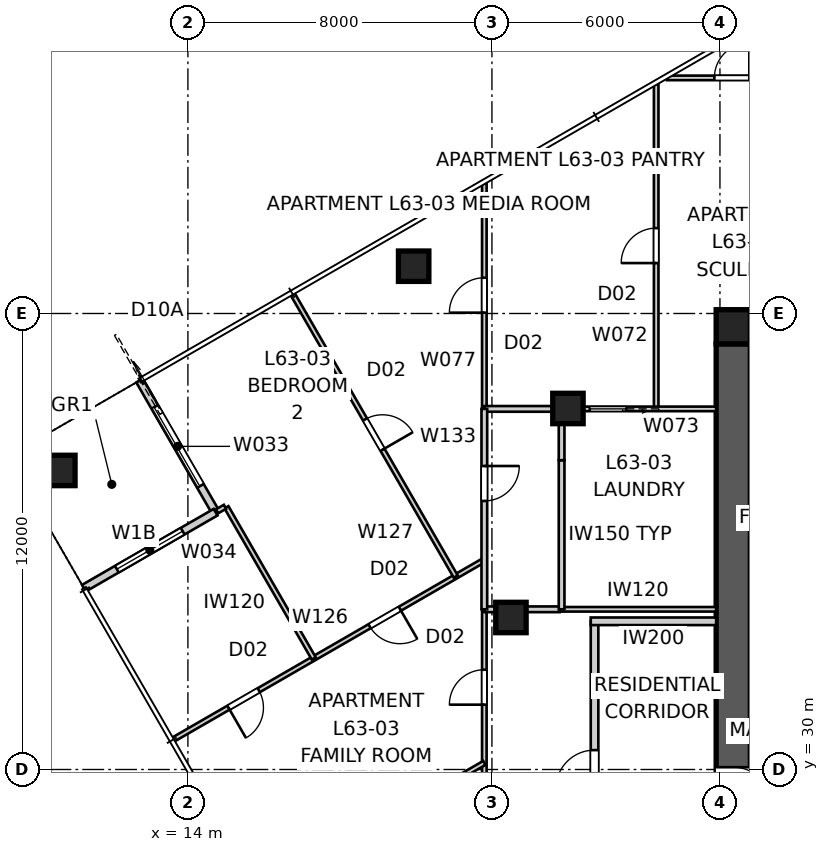
"""IFC4 building model, lengths in metres.
Left out: names, types, materials, properties, quantities, classifications, styles, units other than length and angle.
Written with IfcOpenShell. Run it as: python <this file> out.ifc"""

import sys

from ifc_helpers import new_model, si_unit, direction, frame, frame_2d, origin, origin_2d, place, context, subcontext, project, spatial, polyline, rectangle, outline, extrude, element, fill, save


model = new_model("IFC4")
c1 = context("Model", 3, precision=1e-05, world=origin(), true_north=direction((0.0, 1.0)))
c2 = subcontext(c1, "Body", "Model", "MODEL_VIEW")
j1 = project(units=[si_unit("LENGTHUNIT", "METRE"), si_unit("PLANEANGLEUNIT", "RADIAN")], contexts=[c1])
p1 = place(None, origin())
s1 = spatial("IfcSite", under=j1, at=p1, CompositionType="ELEMENT")
p2 = place(p1, origin())
s2 = spatial("IfcBuilding", under=s1, at=p2, CompositionType="ELEMENT")
p3 = place(p2, frame((0.0, 0.0, 228.6)))
s3 = spatial("IfcBuildingStorey", under=s2, at=p3, CompositionType="ELEMENT", Elevation=228.6)
p4 = place(p3, frame((28.8, 41.65, 0.0), z_axis=(0.0, 0.0, 1.0), x_axis=(1.0, 0.0, 0.0)))
e1 = element("IfcWall", 1, at=p4, inside=s3, PredefinedType="SHEAR", context=c2, shape_type="SweptSolid", body=[
    extrude(outline(polyline([(0.0, -0.45), (22.4, -0.45), (22.4, -0.025), (22.85, -0.025), (22.85, 0.025), (22.4, 0.025), (22.4, 0.45), (0.0, 0.45), (0.0, 0.025), (-0.45, 0.025), (-0.45, -0.025), (0.0, -0.025), (0.0, -0.45)])), origin(), (0.0, 0.0, 1.0), 3.4),
])
p5 = place(p3, frame((28.35, 41.2, 0.0), z_axis=(0.0, 0.0, 1.0), x_axis=(0.0, -1.0, 0.0)))
e2 = element("IfcWall", 2, at=p5, inside=s3, PredefinedType="SHEAR", context=c2, shape_type="SweptSolid", body=[
    extrude(outline(polyline([(0.0, -0.45), (22.4, -0.45), (22.4, -0.025), (22.85, -0.025), (22.85, 0.025), (22.4, 0.025), (22.4, 0.45), (0.0, 0.45), (0.0, 0.025), (-0.45, 0.025), (-0.45, -0.025), (0.0, -0.025), (0.0, -0.45)])), origin(), (0.0, 0.0, 1.0), 3.4),
])
p6 = place(p5, frame((11.14, 0.0, 0.0)))
e3 = element("IfcOpeningElement", 3, at=p6, cuts=e2, PredefinedType="OPENING", context=c2, shape_type="SweptSolid", body=[
    extrude(rectangle(XDim=1.02, YDim=2.4, at=frame_2d((0.51, 1.2))), frame((0.0, 0.46, 0.0), z_axis=(0.0, -1.0, 0.0), x_axis=(1.0, 0.0, 0.0)), (0.0, 0.0, 1.0), 0.92),
])
p7 = place(p3, frame((28.35, 41.65, 0.0), z_axis=(0.0, 0.0, 1.0), x_axis=(1.0, 0.0, 0.0)))
e4 = element("IfcColumn", 4, at=p7, inside=s3, PredefinedType="COLUMN", context=c2, shape_type="SweptSolid", body=[
    extrude(rectangle(XDim=0.9, YDim=0.9, at=origin_2d()), origin(), (0.0, 0.0, 1.0), 3.4),
])
for number, where, z_axis, x_axis in (
    (5, (19.94, 43.245, 0.0), (0.0, 0.0, 1.0), (1.0, 0.0, 0.0)),
    (6, (10.63, 37.87, 0.0), (0.0, 0.0, 1.0), (1.0, 0.0, 0.0)),
    (7, (24.0, 39.5, 0.0), (0.0, 0.0, 1.0), (1.0, 0.0, 0.0)),
    (8, (22.5, 34.0, 0.0), (0.0, 0.0, 1.0), (1.0, 0.0, 0.0)),
):
    element("IfcColumn", number, at=place(p3, frame(where, z_axis=z_axis, x_axis=x_axis)), inside=s3, PredefinedType="COLUMN", context=c2, shape_type="SweptSolid", body=[
        extrude(rectangle(XDim=0.8, YDim=0.8, at=origin_2d()), origin(), (0.0, 0.0, 1.0), 3.4),
    ])
p8 = place(p3, frame((12.729, 40.236, 0.0), z_axis=(0.0, 0.0, 1.0), x_axis=(0.49999894854, -0.866026010844, 0.0)))
e9 = element("IfcWall", 9, at=p8, inside=s3, PredefinedType="SOLIDWALL", context=c2, shape_type="SweptSolid", body=[
    extrude(rectangle(XDim=4.0, YDim=0.2, at=frame_2d((2.0, 0.0))), origin(), (0.0, 0.0, 1.0), 3.25),
])
p9 = place(p8, frame((0.8, 0.0, 0.0)))
e10 = element("IfcOpeningElement", 10, at=p9, cuts=e9, PredefinedType="OPENING", context=c2, shape_type="SweptSolid", body=[
    extrude(rectangle(XDim=2.4, YDim=2.1, at=frame_2d((1.2, 1.05))), frame((0.0, 0.11, 0.0), z_axis=(0.0, -1.0, 0.0), x_axis=(1.0, 0.0, 0.0)), (0.0, 0.0, 1.0), 0.22),
])
p10 = place(p3, frame((14.729, 36.771, 0.0), z_axis=(0.0, 0.0, 1.0), x_axis=(-0.866026010844, -0.49999894854, 0.0)))
e11 = element("IfcWall", 11, at=p10, inside=s3, PredefinedType="SOLIDWALL", context=c2, shape_type="SweptSolid", body=[
    extrude(rectangle(XDim=4.0, YDim=0.2, at=frame_2d((2.0, 0.0))), origin(), (0.0, 0.0, 1.0), 3.25),
])
p11 = place(p10, frame((1.0, 0.0, 0.45)))
e12 = element("IfcOpeningElement", 12, at=p11, cuts=e11, PredefinedType="OPENING", context=c2, shape_type="SweptSolid", body=[
    extrude(rectangle(XDim=2.0, YDim=1.8, at=frame_2d((1.0, 0.9))), frame((0.0, 0.11, 0.0), z_axis=(0.0, -1.0, 0.0), x_axis=(1.0, 0.0, 0.0)), (0.0, 0.0, 1.0), 0.22),
])
p12 = place(p3, frame((24.7, 26.1, 0.0), z_axis=(0.0, 0.0, 1.0), x_axis=(0.0, 1.0, 0.0)))
e13 = element("IfcWall", 13, at=p12, inside=s3, PredefinedType="PARTITIONING", context=c2, shape_type="SweptSolid", body=[
    extrude(rectangle(XDim=7.8, YDim=0.2, at=frame_2d((3.9, 0.0))), origin(), (0.0, 0.0, 1.0), 3.25),
])
p13 = place(p12, frame((3.39, 0.0, 0.0)))
e14 = element("IfcOpeningElement", 14, at=p13, cuts=e13, PredefinedType="OPENING", context=c2, shape_type="SweptSolid", body=[
    extrude(rectangle(XDim=1.02, YDim=2.34, at=frame_2d((0.51, 1.17))), frame((0.0, 0.11, 0.0), z_axis=(0.0, -1.0, 0.0), x_axis=(1.0, 0.0, 0.0)), (0.0, 0.0, 1.0), 0.22),
])
p14 = place(p3, frame((27.9, 33.9, 0.0), z_axis=(0.0, 0.0, 1.0), x_axis=(-1.0, 0.0, 0.0)))
e15 = element("IfcWall", 15, at=p14, inside=s3, PredefinedType="PARTITIONING", context=c2, shape_type="SweptSolid", body=[
    extrude(rectangle(XDim=3.3, YDim=0.2, at=frame_2d((1.65, 0.0))), origin(), (0.0, 0.0, 1.0), 3.25),
])
p15 = place(p3, frame((23.783, 34.216, 0.0), z_axis=(0.0, 0.0, 1.0), x_axis=(1.0, 0.0, 0.0)))
e16 = element("IfcWall", 16, at=p15, inside=s3, PredefinedType="PARTITIONING", context=c2, shape_type="SweptSolid", body=[
    extrude(rectangle(XDim=4.117, YDim=0.12, at=frame_2d((2.058, 0.0))), origin(), (0.0, 0.0, 1.0), 3.25),
])
p16 = place(p3, frame((21.8, 16.603, 0.0), z_axis=(0.0, 0.0, 1.0), x_axis=(0.0, 1.0, 0.0)))
e17 = element("IfcWall", 17, at=p16, inside=s3, PredefinedType="PARTITIONING", context=c2, shape_type="SweptSolid", body=[
    extrude(rectangle(XDim=17.613, YDim=0.12, at=frame_2d((8.806, 0.0))), origin(), (0.0, 0.0, 1.0), 3.25),
])
p17 = place(p16, frame((11.052, 0.0, 0.0)))
e18 = element("IfcOpeningElement", 18, at=p17, cuts=e17, PredefinedType="OPENING", context=c2, shape_type="SweptSolid", body=[
    extrude(rectangle(XDim=0.92, YDim=2.34, at=frame_2d((0.46, 1.17))), frame((0.0, 0.07, 0.0), z_axis=(0.0, -1.0, 0.0), x_axis=(1.0, 0.0, 0.0)), (0.0, 0.0, 1.0), 0.14),
])
p18 = place(p16, frame((15.102, 0.0, 0.0)))
e19 = element("IfcOpeningElement", 19, at=p18, cuts=e17, PredefinedType="OPENING", context=c2, shape_type="SweptSolid", body=[
    extrude(rectangle(XDim=0.92, YDim=2.34, at=frame_2d((0.46, 1.17))), frame((0.0, 0.07, 0.0), z_axis=(0.0, -1.0, 0.0), x_axis=(1.0, 0.0, 0.0)), (0.0, 0.0, 1.0), 0.14),
])
p19 = place(p16, frame((0.326, 0.0, 0.0)))
e20 = element("IfcOpeningElement", 20, at=p19, cuts=e17, PredefinedType="OPENING", context=c2, shape_type="SweptSolid", body=[
    extrude(rectangle(XDim=0.96, YDim=2.1, at=frame_2d((0.48, 1.05))), frame((0.0, 0.07, 0.0), z_axis=(0.0, -1.0, 0.0), x_axis=(1.0, 0.0, 0.0)), (0.0, 0.0, 1.0), 0.14),
])
p20 = place(p3, frame((21.8, 34.216, 0.0), z_axis=(0.0, 0.0, 1.0), x_axis=(1.0, 0.0, 0.0)))
e21 = element("IfcWall", 21, at=p20, inside=s3, PredefinedType="SOLIDWALL", context=c2, shape_type="SweptSolid", body=[
    extrude(rectangle(XDim=1.983, YDim=0.15, at=frame_2d((0.992, 0.0))), origin(), (0.0, 0.0, 1.0), 3.25),
])
p21 = place(p3, frame((26.322, 39.49, 0.0), z_axis=(0.0, 0.0, 1.0), x_axis=(0.0, 1.0, 0.0)))
e22 = element("IfcWall", 22, at=p21, inside=s3, PredefinedType="PARTITIONING", context=c2, shape_type="SweptSolid", body=[
    extrude(rectangle(XDim=8.548, YDim=0.12, at=frame_2d((4.274, 0.0))), origin(), (0.0, 0.0, 1.0), 3.25),
])
p22 = place(p21, frame((3.837, 0.0, 0.0)))
e23 = element("IfcOpeningElement", 23, at=p22, cuts=e22, PredefinedType="OPENING", context=c2, shape_type="SweptSolid", body=[
    extrude(rectangle(XDim=0.92, YDim=2.34, at=frame_2d((0.46, 1.17))), frame((0.0, 0.07, 0.0), z_axis=(0.0, -1.0, 0.0), x_axis=(1.0, 0.0, 0.0)), (0.0, 0.0, 1.0), 0.14),
])
p23 = place(p3, frame((27.9, 39.49, 0.0), z_axis=(0.0, 0.0, 1.0), x_axis=(-1.0, 0.0, 0.0)))
e24 = element("IfcWall", 24, at=p23, inside=s3, PredefinedType="PARTITIONING", context=c2, shape_type="SweptSolid", body=[
    extrude(rectangle(XDim=4.116, YDim=0.12, at=frame_2d((2.058, 0.0))), origin(), (0.0, 0.0, 1.0), 3.25),
])
p24 = place(p23, frame((2.367, 0.0, 0.0)))
e25 = element("IfcOpeningElement", 25, at=p24, cuts=e24, PredefinedType="OPENING", context=c2, shape_type="SweptSolid", body=[
    extrude(rectangle(XDim=0.96, YDim=2.1, at=frame_2d((0.48, 1.05))), frame((0.0, 0.07, 0.0), z_axis=(0.0, -1.0, 0.0), x_axis=(1.0, 0.0, 0.0)), (0.0, 0.0, 1.0), 0.14),
])
p25 = place(p3, frame((26.603, 48.2, 0.0), z_axis=(0.0, 0.0, 1.0), x_axis=(1.0, 0.0, 0.0)))
e26 = element("IfcWall", 26, at=p25, inside=s3, PredefinedType="PARTITIONING", context=c2, shape_type="SweptSolid", body=[
    extrude(rectangle(XDim=13.62, YDim=0.12, at=frame_2d((6.81, 0.0))), origin(), (0.0, 0.0, 1.0), 3.25),
])
p26 = place(p25, frame((1.25, 0.0, 0.0)))
e27 = element("IfcOpeningElement", 27, at=p26, cuts=e26, PredefinedType="OPENING", context=c2, shape_type="SweptSolid", body=[
    extrude(rectangle(XDim=0.92, YDim=2.1, at=frame_2d((0.46, 1.05))), frame((0.0, 0.07, 0.0), z_axis=(0.0, -1.0, 0.0), x_axis=(1.0, 0.0, 0.0)), (0.0, 0.0, 1.0), 0.14),
])
p27 = place(p3, frame((21.8, 39.49, 0.0), z_axis=(0.0, 0.0, 1.0), x_axis=(0.0, 1.0, 0.0)))
e28 = element("IfcWall", 28, at=p27, inside=s3, PredefinedType="PARTITIONING", context=c2, shape_type="SweptSolid", body=[
    extrude(rectangle(XDim=5.937, YDim=0.12, at=frame_2d((2.969, 0.0))), origin(), (0.0, 0.0, 1.0), 3.25),
])
p28 = place(p27, frame((2.532, 0.0, 0.0)))
e29 = element("IfcOpeningElement", 29, at=p28, cuts=e28, PredefinedType="OPENING", context=c2, shape_type="SweptSolid", body=[
    extrude(rectangle(XDim=0.92, YDim=2.34, at=frame_2d((0.46, 1.17))), frame((0.0, 0.07, 0.0), z_axis=(0.0, -1.0, 0.0), x_axis=(1.0, 0.0, 0.0)), (0.0, 0.0, 1.0), 0.14),
])
p29 = place(p3, frame((23.783, 39.49, 0.0), z_axis=(0.0, 0.0, 1.0), x_axis=(-1.0, 0.0, 0.0)))
e30 = element("IfcWall", 30, at=p29, inside=s3, PredefinedType="SOLIDWALL", context=c2, shape_type="SweptSolid", body=[
    extrude(rectangle(XDim=1.983, YDim=0.15, at=frame_2d((0.992, 0.0))), origin(), (0.0, 0.0, 1.0), 3.25),
])
p30 = place(p3, frame((23.833, 34.216, 0.0), z_axis=(0.0, 0.0, 1.0), x_axis=(0.0, 1.0, 0.0)))
e31 = element("IfcWall", 31, at=p30, inside=s3, PredefinedType="SOLIDWALL", context=c2, shape_type="SweptSolid", body=[
    extrude(rectangle(XDim=3.923, YDim=0.15, at=frame_2d((1.961, 0.0))), origin(), (0.0, 0.0, 1.0), 3.25),
])
p31 = place(p3, frame((23.833, 38.139, 0.0), z_axis=(0.0, 0.0, 1.0), x_axis=(0.0, 1.0, 0.0)))
e32 = element("IfcWall", 32, at=p31, inside=s3, PredefinedType="SOLIDWALL", context=c2, shape_type="SweptSolid", body=[
    extrude(rectangle(XDim=1.351, YDim=0.15, at=frame_2d((0.675, 0.0))), origin(), (0.0, 0.0, 1.0), 2.55),
])
p32 = place(p3, frame((21.8, 35.514, 0.0), z_axis=(0.0, 0.0, 1.0), x_axis=(-0.86602907136, -0.49999364752, 0.0)))
e33 = element("IfcWall", 33, at=p32, inside=s3, PredefinedType="PARTITIONING", context=c2, shape_type="SweptSolid", body=[
    extrude(rectangle(XDim=9.455, YDim=0.12, at=frame_2d((4.728, 0.0))), origin(), (0.0, 0.0, 1.0), 3.25),
])
p33 = place(p32, frame((6.854, 0.0, 0.0)))
e34 = element("IfcOpeningElement", 34, at=p33, cuts=e33, PredefinedType="OPENING", context=c2, shape_type="SweptSolid", body=[
    extrude(rectangle(XDim=0.92, YDim=2.34, at=frame_2d((0.46, 1.17))), frame((0.0, 0.07, 0.0), z_axis=(0.0, -1.0, 0.0), x_axis=(1.0, 0.0, 0.0)), (0.0, 0.0, 1.0), 0.14),
])
p34 = place(p32, frame((2.566, 0.0, 0.0)))
e35 = element("IfcOpeningElement", 35, at=p34, cuts=e33, PredefinedType="OPENING", context=c2, shape_type="SweptSolid", body=[
    extrude(rectangle(XDim=0.92, YDim=2.34, at=frame_2d((0.46, 1.17))), frame((0.0, 0.07, 0.0), z_axis=(0.0, -1.0, 0.0), x_axis=(1.0, 0.0, 0.0)), (0.0, 0.0, 1.0), 0.14),
])
p35 = place(p3, frame((16.754, 42.513, 0.0), z_axis=(0.0, 0.0, 1.0), x_axis=(0.500017009237, -0.866015583274, 0.0)))
e36 = element("IfcWall", 36, at=p35, inside=s3, PredefinedType="PARTITIONING", context=c2, shape_type="SweptSolid", body=[
    extrude(rectangle(XDim=8.586, YDim=0.12, at=frame_2d((4.293, 0.0))), origin(), (0.0, 0.0, 1.0), 3.25),
])
p36 = place(p35, frame((3.813, 0.0, 0.0)))
e37 = element("IfcOpeningElement", 37, at=p36, cuts=e36, PredefinedType="OPENING", context=c2, shape_type="SweptSolid", body=[
    extrude(rectangle(XDim=0.92, YDim=2.34, at=frame_2d((0.46, 1.17))), frame((0.0, 0.07, 0.0), z_axis=(0.0, -1.0, 0.0), x_axis=(1.0, 0.0, 0.0)), (0.0, 0.0, 1.0), 0.14),
])
p37 = place(p3, frame((17.312, 32.922, 0.0), z_axis=(0.0, 0.0, 1.0), x_axis=(-0.499984590049, 0.866034300541, 0.0)))
e38 = element("IfcWall", 38, at=p37, inside=s3, PredefinedType="PARTITIONING", context=c2, shape_type="SweptSolid", body=[
    extrude(rectangle(XDim=4.595, YDim=0.12, at=frame_2d((2.298, 0.0))), origin(), (0.0, 0.0, 1.0), 3.25),
])
p38 = place(p3, frame((14.976, 36.914, 0.0), z_axis=(0.0, 0.0, 1.0), x_axis=(-0.86640078905, -0.499349249257, 0.0)))
e39 = element("IfcWall", 39, at=p38, inside=s3, PredefinedType="PARTITIONING", context=c2, shape_type="SweptSolid", body=[
    extrude(rectangle(XDim=0.245, YDim=0.12, at=frame_2d((0.123, 0.0))), origin(), (0.0, 0.0, 1.0), 3.25),
])
p39 = place(p3, frame((21.8, 30.173, 0.0), z_axis=(0.0, 0.0, 1.0), x_axis=(-0.866020204108, -0.500009005995, 0.0)))
e40 = element("IfcWall", 40, at=p39, inside=s3, PredefinedType="PARTITIONING", context=c2, shape_type="SweptSolid", body=[
    extrude(rectangle(XDim=6.785, YDim=0.12, at=frame_2d((3.393, 0.0))), origin(), (0.0, 0.0, 1.0), 3.25),
])
p40 = place(p3, frame((21.8, 39.49, 0.0), z_axis=(0.0, 0.0, 1.0), x_axis=(0.0, -1.0, 0.0)))
e41 = element("IfcWall", 41, at=p40, inside=s3, PredefinedType="SOLIDWALL", context=c2, shape_type="SweptSolid", body=[
    extrude(rectangle(XDim=5.274, YDim=0.15, at=frame_2d((2.637, 0.0))), origin(), (0.0, 0.0, 1.0), 3.25),
])
p41 = place(p40, frame((1.503, 0.0, 0.0)))
e42 = element("IfcOpeningElement", 42, at=p41, cuts=e41, PredefinedType="OPENING", context=c2, shape_type="SweptSolid", body=[
    extrude(rectangle(XDim=0.92, YDim=2.34, at=frame_2d((0.46, 1.17))), frame((0.0, 0.085, 0.0), z_axis=(0.0, -1.0, 0.0), x_axis=(1.0, 0.0, 0.0)), (0.0, 0.0, 1.0), 0.17),
])
p42 = place(p9, origin())
e43 = element("IfcDoor", 43, at=p42, inside=s3, OperationType="SLIDING_TO_LEFT", PredefinedType="DOOR", context=c2, shape_type="SweptSolid", body=[
    extrude(rectangle(XDim=2.4, YDim=2.1, at=frame_2d((1.2, 1.05))), frame((0.0, 0.025, 0.0), z_axis=(0.0, -1.0, 0.0), x_axis=(1.0, 0.0, 0.0)), (0.0, 0.0, 1.0), 0.05),
])
fill(e10, e43)
p43 = place(p11, origin())
e44 = element("IfcWindow", 44, at=p43, inside=s3, PartitioningType="SINGLE_PANEL", PredefinedType="WINDOW", context=c2, shape_type="SweptSolid", body=[
    extrude(rectangle(XDim=2.0, YDim=1.8, at=frame_2d((1.0, 0.9))), frame((0.0, 0.03, 0.0), z_axis=(0.0, -1.0, 0.0), x_axis=(1.0, 0.0, 0.0)), (0.0, 0.0, 1.0), 0.06),
])
fill(e12, e44)
p44 = place(p13, origin())
e45 = element("IfcDoor", 45, at=p44, inside=s3, OperationType="SINGLE_SWING_LEFT", PredefinedType="DOOR", context=c2, shape_type="SweptSolid", body=[
    extrude(rectangle(XDim=1.02, YDim=2.34, at=frame_2d((0.51, 1.17))), frame((0.0, 0.025, 0.0), z_axis=(0.0, -1.0, 0.0), x_axis=(1.0, 0.0, 0.0)), (0.0, 0.0, 1.0), 0.05),
])
fill(e14, e45)
p45 = place(p18, origin())
e46 = element("IfcDoor", 46, at=p45, inside=s3, OperationType="SINGLE_SWING_LEFT", PredefinedType="DOOR", context=c2, shape_type="SweptSolid", body=[
    extrude(rectangle(XDim=0.92, YDim=2.34, at=frame_2d((0.46, 1.17))), frame((0.0, 0.025, 0.0), z_axis=(0.0, -1.0, 0.0), x_axis=(1.0, 0.0, 0.0)), (0.0, 0.0, 1.0), 0.05),
])
fill(e19, e46)
p46 = place(p33, origin())
e47 = element("IfcDoor", 47, at=p46, inside=s3, OperationType="SINGLE_SWING_RIGHT", PredefinedType="DOOR", context=c2, shape_type="SweptSolid", body=[
    extrude(rectangle(XDim=0.92, YDim=2.34, at=frame_2d((0.46, 1.17))), frame((0.0, 0.025, 0.0), z_axis=(0.0, -1.0, 0.0), x_axis=(1.0, 0.0, 0.0)), (0.0, 0.0, 1.0), 0.05),
])
fill(e34, e47)
p47 = place(p34, origin())
e48 = element("IfcDoor", 48, at=p47, inside=s3, OperationType="SINGLE_SWING_LEFT", PredefinedType="DOOR", context=c2, shape_type="SweptSolid", body=[
    extrude(rectangle(XDim=0.92, YDim=2.34, at=frame_2d((0.46, 1.17))), frame((0.0, 0.025, 0.0), z_axis=(0.0, -1.0, 0.0), x_axis=(1.0, 0.0, 0.0)), (0.0, 0.0, 1.0), 0.05),
])
fill(e35, e48)
p48 = place(p36, origin())
e49 = element("IfcDoor", 49, at=p48, inside=s3, OperationType="SINGLE_SWING_RIGHT", PredefinedType="DOOR", context=c2, shape_type="SweptSolid", body=[
    extrude(rectangle(XDim=0.92, YDim=2.34, at=frame_2d((0.46, 1.17))), frame((0.0, 0.025, 0.0), z_axis=(0.0, -1.0, 0.0), x_axis=(1.0, 0.0, 0.0)), (0.0, 0.0, 1.0), 0.05),
])
fill(e37, e49)
p49 = place(p28, origin())
e50 = element("IfcDoor", 50, at=p49, inside=s3, OperationType="SINGLE_SWING_LEFT", PredefinedType="DOOR", context=c2, shape_type="SweptSolid", body=[
    extrude(rectangle(XDim=0.92, YDim=2.34, at=frame_2d((0.46, 1.17))), frame((0.0, 0.025, 0.0), z_axis=(0.0, -1.0, 0.0), x_axis=(1.0, 0.0, 0.0)), (0.0, 0.0, 1.0), 0.05),
])
fill(e29, e50)
p50 = place(p41, origin())
e51 = element("IfcDoor", 51, at=p50, inside=s3, OperationType="SINGLE_SWING_LEFT", PredefinedType="DOOR", context=c2, shape_type="SweptSolid", body=[
    extrude(rectangle(XDim=0.92, YDim=2.34, at=frame_2d((0.46, 1.17))), frame((0.0, 0.025, 0.0), z_axis=(0.0, -1.0, 0.0), x_axis=(1.0, 0.0, 0.0)), (0.0, 0.0, 1.0), 0.05),
])
fill(e42, e51)
p51 = place(p22, origin())
e52 = element("IfcDoor", 52, at=p51, inside=s3, OperationType="SINGLE_SWING_LEFT", PredefinedType="DOOR", context=c2, shape_type="SweptSolid", body=[
    extrude(rectangle(XDim=0.92, YDim=2.34, at=frame_2d((0.46, 1.17))), frame((0.0, 0.025, 0.0), z_axis=(0.0, -1.0, 0.0), x_axis=(1.0, 0.0, 0.0)), (0.0, 0.0, 1.0), 0.05),
])
fill(e23, e52)
p52 = place(p24, origin())
e53 = element("IfcDoor", 53, at=p52, inside=s3, OperationType="SLIDING_TO_LEFT", PredefinedType="DOOR", context=c2, shape_type="SweptSolid", body=[
    extrude(rectangle(XDim=0.96, YDim=2.1, at=frame_2d((0.48, 1.05))), frame((0.0, 0.025, 0.0), z_axis=(0.0, -1.0, 0.0), x_axis=(1.0, 0.0, 0.0)), (0.0, 0.0, 1.0), 0.05),
])
fill(e25, e53)
p53 = place(p26, origin())
e54 = element("IfcDoor", 54, at=p53, inside=s3, OperationType="SINGLE_SWING_RIGHT", PredefinedType="DOOR", context=c2, shape_type="SweptSolid", body=[
    extrude(rectangle(XDim=0.92, YDim=2.1, at=frame_2d((0.46, 1.05))), frame((0.0, 0.025, 0.0), z_axis=(0.0, -1.0, 0.0), x_axis=(1.0, 0.0, 0.0)), (0.0, 0.0, 1.0), 0.05),
])
fill(e27, e54)
p54 = place(p6, origin())
e55 = element("IfcDoor", 55, at=p54, inside=s3, OperationType="SINGLE_SWING_RIGHT", PredefinedType="DOOR", context=c2, shape_type="SweptSolid", body=[
    extrude(rectangle(XDim=1.02, YDim=2.4, at=frame_2d((0.51, 1.2))), frame((0.0, 0.025, 0.0), z_axis=(0.0, -1.0, 0.0), x_axis=(1.0, 0.0, 0.0)), (0.0, 0.0, 1.0), 0.05),
])
fill(e3, e55)
save(model, sys.argv[1])
